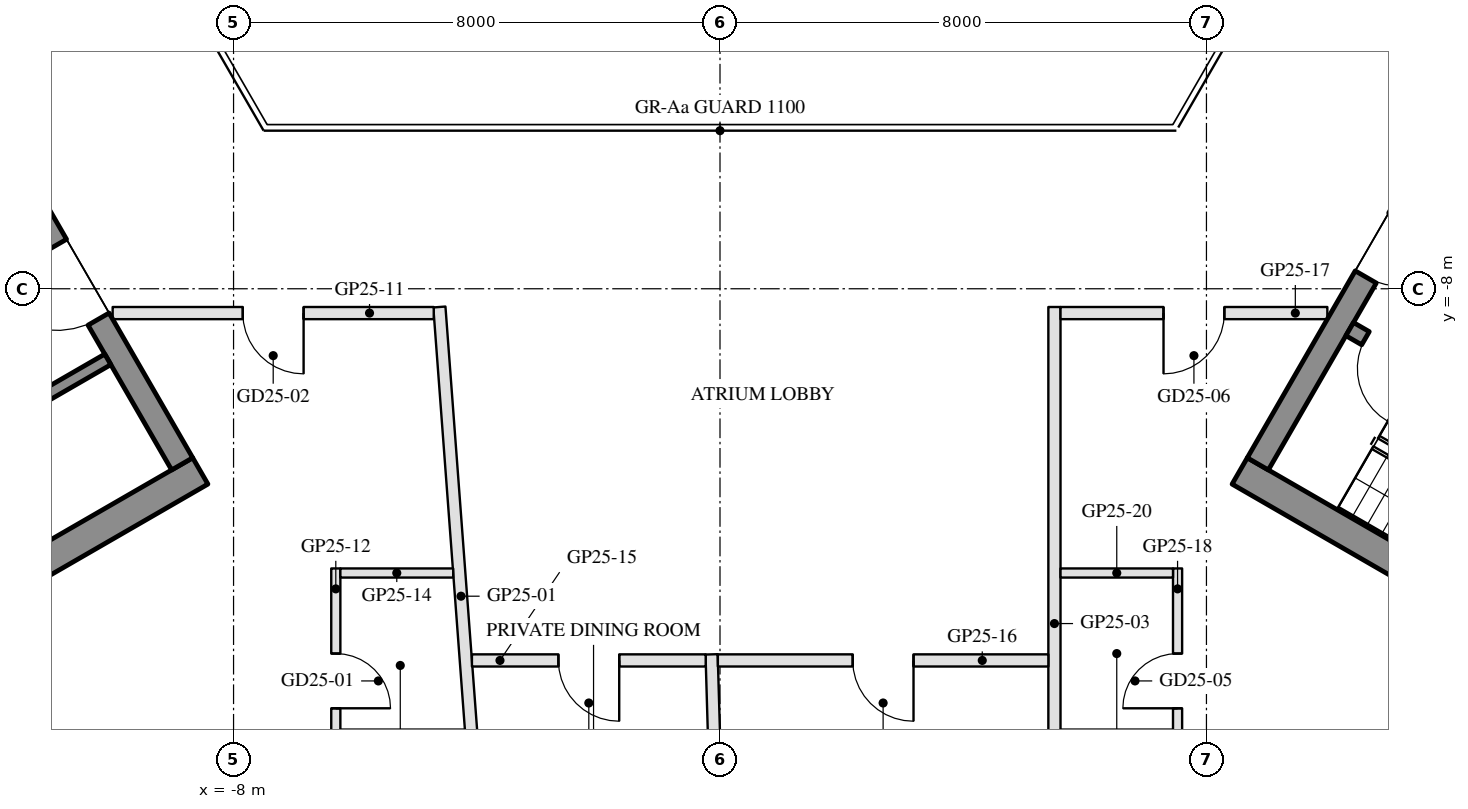
"""IFC4 building model, lengths in metres.
Left out: names, types, materials, properties, quantities, classifications, styles, units other than length and angle.
Written with IfcOpenShell. Run it as: python <this file> out.ifc"""

import sys

from ifc_helpers import new_model, si_unit, direction, frame, frame_2d, origin, place, context, subcontext, project, spatial, rectangle, extrude, element, fill, save


model = new_model("IFC4")
c1 = context("Model", 3, precision=1e-05, world=origin(), true_north=direction((0.0, 1.0)))
c2 = subcontext(c1, "Body", "Model", "MODEL_VIEW")
j1 = project(units=[si_unit("LENGTHUNIT", "METRE"), si_unit("PLANEANGLEUNIT", "RADIAN")], contexts=[c1])
p1 = place(None, origin())
s1 = spatial("IfcSite", under=j1, at=p1, CompositionType="ELEMENT")
p2 = place(p1, origin())
s2 = spatial("IfcBuilding", under=s1, at=p2, CompositionType="ELEMENT")
p3 = place(p2, frame((0.0, 0.0, 265.2)))
s3 = spatial("IfcBuildingStorey", under=s2, at=p3, CompositionType="ELEMENT", Elevation=265.2)
p4 = place(p3, frame((-8.547, -10.997, 0.0), z_axis=(0.0, 0.0, 1.0), x_axis=(-0.86602744543, -0.49999646375, 0.0)))
e1 = element("IfcWall", 1, at=p4, inside=s3, PredefinedType="SHEAR", context=c2, shape_type="SweptSolid", body=[
    extrude(rectangle(XDim=13.934, YDim=0.5, at=frame_2d((6.967, 0.0))), origin(), (0.0, 0.0, 1.0), 3.5),
])
p5 = place(p3, frame((-13.845, -2.22, 0.0), z_axis=(0.0, 0.0, 1.0), x_axis=(0.500004234368, -0.866022959057, 0.0)))
e2 = element("IfcWall", 2, at=p5, inside=s3, PredefinedType="SHEAR", context=c2, shape_type="SweptSolid", body=[
    extrude(rectangle(XDim=10.0, YDim=0.4, at=frame_2d((5.0, 0.0))), origin(), (0.0, 0.0, 1.0), 3.5),
])
p6 = place(p5, frame((3.55, 0.0, 0.0)))
e3 = element("IfcOpeningElement", 3, at=p6, cuts=e2, PredefinedType="OPENING", context=c2, shape_type="SweptSolid", body=[
    extrude(rectangle(XDim=1.1, YDim=2.1, at=frame_2d((0.55, 1.05))), frame((0.0, 0.21, 0.0), z_axis=(0.0, -1.0, 0.0), x_axis=(1.0, 0.0, 0.0)), (0.0, 0.0, 1.0), 0.42),
])
p7 = place(p5, frame((5.85, 0.0, 0.0)))
e4 = element("IfcOpeningElement", 4, at=p7, cuts=e2, PredefinedType="OPENING", context=c2, shape_type="SweptSolid", body=[
    extrude(rectangle(XDim=1.4, YDim=2.1, at=frame_2d((0.7, 1.05))), frame((0.0, 0.21, 0.0), z_axis=(0.0, -1.0, 0.0), x_axis=(1.0, 0.0, 0.0)), (0.0, 0.0, 1.0), 0.42),
])
p8 = place(p3, frame((-10.068, -9.162, 0.0), z_axis=(0.0, 0.0, 1.0), x_axis=(-0.866032725843, -0.499987317609, 0.0)))
e5 = element("IfcWall", 5, at=p8, inside=s3, PredefinedType="SHEAR", context=c2, shape_type="SweptSolid", body=[
    extrude(rectangle(XDim=10.16, YDim=0.2, at=frame_2d((5.08, 0.0))), origin(), (0.0, 0.0, 1.0), 3.5),
])
p9 = place(p8, frame((4.53, 0.0, 0.0)))
e6 = element("IfcOpeningElement", 6, at=p9, cuts=e5, PredefinedType="OPENING", context=c2, shape_type="SweptSolid", body=[
    extrude(rectangle(XDim=0.9, YDim=2.1, at=frame_2d((0.45, 1.05))), frame((0.0, 0.11, 0.0), z_axis=(0.0, -1.0, 0.0), x_axis=(1.0, 0.0, 0.0)), (0.0, 0.0, 1.0), 0.22),
])
p10 = place(p3, frame((8.547, -10.997, 0.0), z_axis=(0.0, 0.0, 1.0), x_axis=(0.86602744543, -0.49999646375, 0.0)))
e7 = element("IfcWall", 7, at=p10, inside=s3, PredefinedType="SHEAR", context=c2, shape_type="SweptSolid", body=[
    extrude(rectangle(XDim=13.934, YDim=0.5, at=frame_2d((6.967, 0.0))), origin(), (0.0, 0.0, 1.0), 3.5),
])
p11 = place(p3, frame((8.845, -10.88, 0.0), z_axis=(0.0, 0.0, 1.0), x_axis=(0.500004234368, 0.866022959057, 0.0)))
e8 = element("IfcWall", 8, at=p11, inside=s3, PredefinedType="SHEAR", context=c2, shape_type="SweptSolid", body=[
    extrude(rectangle(XDim=10.0, YDim=0.4, at=frame_2d((5.0, 0.0))), origin(), (0.0, 0.0, 1.0), 3.5),
])
p12 = place(p11, frame((3.55, 0.0, 0.0)))
e9 = element("IfcOpeningElement", 9, at=p12, cuts=e8, PredefinedType="OPENING", context=c2, shape_type="SweptSolid", body=[
    extrude(rectangle(XDim=1.1, YDim=2.1, at=frame_2d((0.55, 1.05))), frame((0.0, 0.21, 0.0), z_axis=(0.0, -1.0, 0.0), x_axis=(1.0, 0.0, 0.0)), (0.0, 0.0, 1.0), 0.42),
])
p13 = place(p11, frame((5.85, 0.0, 0.0)))
e10 = element("IfcOpeningElement", 10, at=p13, cuts=e8, PredefinedType="OPENING", context=c2, shape_type="SweptSolid", body=[
    extrude(rectangle(XDim=1.4, YDim=2.1, at=frame_2d((0.7, 1.05))), frame((0.0, 0.21, 0.0), z_axis=(0.0, -1.0, 0.0), x_axis=(1.0, 0.0, 0.0)), (0.0, 0.0, 1.0), 0.42),
])
p14 = place(p3, frame((10.356, -8.664, 0.0), z_axis=(0.0, 0.0, 1.0), x_axis=(0.866028629588, -0.499994412703, 0.0)))
e11 = element("IfcWall", 11, at=p14, inside=s3, PredefinedType="SHEAR", context=c2, shape_type="SweptSolid", body=[
    extrude(rectangle(XDim=6.45, YDim=0.25, at=frame_2d((3.225, 0.0))), origin(), (0.0, 0.0, 1.0), 3.5),
])
p15 = place(p14, frame((0.3, 0.0, 0.0)))
e12 = element("IfcOpeningElement", 12, at=p15, cuts=e11, PredefinedType="OPENING", context=c2, shape_type="SweptSolid", body=[
    extrude(rectangle(XDim=1.0, YDim=2.1, at=frame_2d((0.5, 1.05))), frame((0.0, 0.135, 0.0), z_axis=(0.0, -1.0, 0.0), x_axis=(1.0, 0.0, 0.0)), (0.0, 0.0, 1.0), 0.27),
])
p16 = place(p3, frame((-3.903, -17.813, 0.0), z_axis=(0.0, 0.0, 1.0), x_axis=(-0.074602257677, 0.997213368918, 0.0)))
e13 = element("IfcWall", 13, at=p16, inside=s3, PredefinedType="PARTITIONING", context=c2, shape_type="SweptSolid", body=[
    extrude(rectangle(XDim=9.54, YDim=0.2, at=frame_2d((4.77, 0.0))), origin(), (0.0, 0.0, 1.0), 3.1),
])
p17 = place(p3, frame((-0.057, -16.767, 0.0), z_axis=(0.0, 0.0, 1.0), x_axis=(-0.029417278295, 0.999567218219, 0.0)))
e14 = element("IfcWall", 14, at=p17, inside=s3, PredefinedType="PARTITIONING", context=c2, shape_type="SweptSolid", body=[
    extrude(rectangle(XDim=2.755, YDim=0.2, at=frame_2d((1.378, 0.0))), origin(), (0.0, 0.0, 1.0), 3.0),
])
p18 = place(p3, frame((5.5, -18.713, 0.0), z_axis=(0.0, 0.0, 1.0), x_axis=(0.0, 1.0, 0.0)))
e15 = element("IfcWall", 15, at=p18, inside=s3, PredefinedType="PARTITIONING", context=c2, shape_type="SweptSolid", body=[
    extrude(rectangle(XDim=10.413, YDim=0.2, at=frame_2d((5.207, 0.0))), origin(), (0.0, 0.0, 1.0), 3.1),
])
p19 = place(p3, frame((-4.708, -8.4, 0.0), z_axis=(0.0, 0.0, 1.0), x_axis=(-1.0, 0.0, 0.0)))
e16 = element("IfcWall", 16, at=p19, inside=s3, PredefinedType="PARTITIONING", context=c2, shape_type="SweptSolid", body=[
    extrude(rectangle(XDim=5.281, YDim=0.2, at=frame_2d((2.64, 0.0))), origin(), (0.0, 0.0, 1.0), 3.0),
])
p20 = place(p19, frame((2.14, 0.0, 0.0)))
e17 = element("IfcOpeningElement", 17, at=p20, cuts=e16, PredefinedType="OPENING", context=c2, shape_type="SweptSolid", body=[
    extrude(rectangle(XDim=1.0, YDim=2.1, at=frame_2d((0.5, 1.05))), frame((0.0, 0.11, 0.0), z_axis=(0.0, -1.0, 0.0), x_axis=(1.0, 0.0, 0.0)), (0.0, 0.0, 1.0), 0.22),
])
p21 = place(p3, frame((-6.319, -12.6, 0.0), z_axis=(0.0, 0.0, 1.0), x_axis=(0.0, -1.0, 0.0)))
e18 = element("IfcWall", 18, at=p21, inside=s3, PredefinedType="PARTITIONING", context=c2, shape_type="SweptSolid", body=[
    extrude(rectangle(XDim=2.8, YDim=0.15, at=frame_2d((1.4, 0.0))), origin(), (0.0, 0.0, 1.0), 3.55),
])
p22 = place(p21, frame((1.4, 0.0, 0.0)))
e19 = element("IfcOpeningElement", 19, at=p22, cuts=e18, PredefinedType="OPENING", context=c2, shape_type="SweptSolid", body=[
    extrude(rectangle(XDim=0.9, YDim=2.1, at=frame_2d((0.45, 1.05))), frame((0.0, 0.085, 0.0), z_axis=(0.0, -1.0, 0.0), x_axis=(1.0, 0.0, 0.0)), (0.0, 0.0, 1.0), 0.17),
])
p23 = place(p3, frame((-6.243, -12.675, 0.0), z_axis=(0.0, 0.0, 1.0), x_axis=(1.0, 0.0, 0.0)))
e20 = element("IfcWall", 20, at=p23, inside=s3, PredefinedType="PARTITIONING", context=c2, shape_type="SweptSolid", body=[
    extrude(rectangle(XDim=1.855, YDim=0.15, at=frame_2d((0.928, 0.0))), origin(), (0.0, 0.0, 1.0), 3.55),
])
p24 = place(p3, frame((-0.235, -14.113, 0.0), z_axis=(0.0, 0.0, 1.0), x_axis=(-1.0, 0.0, 0.0)))
e21 = element("IfcWall", 21, at=p24, inside=s3, PredefinedType="PARTITIONING", context=c2, shape_type="SweptSolid", body=[
    extrude(rectangle(XDim=3.845, YDim=0.2, at=frame_2d((1.922, 0.0))), origin(), (0.0, 0.0, 1.0), 3.0),
])
p25 = place(p24, frame((1.422, 0.0, 0.0)))
e22 = element("IfcOpeningElement", 22, at=p25, cuts=e21, PredefinedType="OPENING", context=c2, shape_type="SweptSolid", body=[
    extrude(rectangle(XDim=1.0, YDim=2.1, at=frame_2d((0.5, 1.05))), frame((0.0, 0.11, 0.0), z_axis=(0.0, -1.0, 0.0), x_axis=(1.0, 0.0, 0.0)), (0.0, 0.0, 1.0), 0.22),
])
p26 = place(p3, frame((5.4, -14.113, 0.0), z_axis=(0.0, 0.0, 1.0), x_axis=(-1.0, 0.0, 0.0)))
e23 = element("IfcWall", 23, at=p26, inside=s3, PredefinedType="PARTITIONING", context=c2, shape_type="SweptSolid", body=[
    extrude(rectangle(XDim=5.435, YDim=0.2, at=frame_2d((2.718, 0.0))), origin(), (0.0, 0.0, 1.0), 3.0),
])
p27 = place(p26, frame((2.218, 0.0, 0.0)))
e24 = element("IfcOpeningElement", 24, at=p27, cuts=e23, PredefinedType="OPENING", context=c2, shape_type="SweptSolid", body=[
    extrude(rectangle(XDim=1.0, YDim=2.1, at=frame_2d((0.5, 1.05))), frame((0.0, 0.11, 0.0), z_axis=(0.0, -1.0, 0.0), x_axis=(1.0, 0.0, 0.0)), (0.0, 0.0, 1.0), 0.22),
])
p28 = place(p3, frame((9.988, -8.4, 0.0), z_axis=(0.0, 0.0, 1.0), x_axis=(-1.0, 0.0, 0.0)))
e25 = element("IfcWall", 25, at=p28, inside=s3, PredefinedType="PARTITIONING", context=c2, shape_type="SweptSolid", body=[
    extrude(rectangle(XDim=4.388, YDim=0.2, at=frame_2d((2.194, 0.0))), origin(), (0.0, 0.0, 1.0), 3.0),
])
p29 = place(p28, frame((1.694, 0.0, 0.0)))
e26 = element("IfcOpeningElement", 26, at=p29, cuts=e25, PredefinedType="OPENING", context=c2, shape_type="SweptSolid", body=[
    extrude(rectangle(XDim=1.0, YDim=2.1, at=frame_2d((0.5, 1.05))), frame((0.0, 0.11, 0.0), z_axis=(0.0, -1.0, 0.0), x_axis=(1.0, 0.0, 0.0)), (0.0, 0.0, 1.0), 0.22),
])
p30 = place(p3, frame((7.525, -15.4, 0.0), z_axis=(0.0, 0.0, 1.0), x_axis=(0.0, 1.0, 0.0)))
e27 = element("IfcWall", 27, at=p30, inside=s3, PredefinedType="PARTITIONING", context=c2, shape_type="SweptSolid", body=[
    extrude(rectangle(XDim=2.8, YDim=0.15, at=frame_2d((1.4, 0.0))), origin(), (0.0, 0.0, 1.0), 3.0),
])
p31 = place(p30, frame((0.5, 0.0, 0.0)))
e28 = element("IfcOpeningElement", 28, at=p31, cuts=e27, PredefinedType="OPENING", context=c2, shape_type="SweptSolid", body=[
    extrude(rectangle(XDim=0.9, YDim=2.1, at=frame_2d((0.45, 1.05))), frame((0.0, 0.085, 0.0), z_axis=(0.0, -1.0, 0.0), x_axis=(1.0, 0.0, 0.0)), (0.0, 0.0, 1.0), 0.17),
])
p32 = place(p3, frame((5.6, -12.675, 0.0), z_axis=(0.0, 0.0, 1.0), x_axis=(1.0, 0.0, 0.0)))
e29 = element("IfcWall", 29, at=p32, inside=s3, PredefinedType="PARTITIONING", context=c2, shape_type="SweptSolid", body=[
    extrude(rectangle(XDim=1.85, YDim=0.15, at=frame_2d((0.925, 0.0))), origin(), (0.0, 0.0, 1.0), 3.0),
])
p33 = place(p3, frame((10.378, -1.175, 0.0), z_axis=(0.0, 0.0, 1.0), x_axis=(0.50004096614, -0.86600175068, 0.0)))
e30 = element("IfcWall", 30, at=p33, inside=s3, PredefinedType="PARTITIONING", context=c2, shape_type="SweptSolid", body=[
    extrude(rectangle(XDim=3.782, YDim=0.2, at=frame_2d((1.891, 0.0))), origin(), (0.0, 0.0, 1.0), 3.0),
])
p34 = place(p33, frame((1.391, 0.0, 0.0)))
e31 = element("IfcOpeningElement", 31, at=p34, cuts=e30, PredefinedType="OPENING", context=c2, shape_type="SweptSolid", body=[
    extrude(rectangle(XDim=1.0, YDim=2.1, at=frame_2d((0.5, 1.05))), frame((0.0, 0.11, 0.0), z_axis=(0.0, -1.0, 0.0), x_axis=(1.0, 0.0, 0.0)), (0.0, 0.0, 1.0), 0.22),
])
p35 = place(p3, frame((-12.269, -4.45, 0.0), z_axis=(0.0, 0.0, 1.0), x_axis=(0.500009958894, 0.866019653938, 0.0)))
e32 = element("IfcWall", 32, at=p35, inside=s3, PredefinedType="PARTITIONING", context=c2, shape_type="SweptSolid", body=[
    extrude(rectangle(XDim=5.685, YDim=0.2, at=frame_2d((2.842, 0.0))), origin(), (0.0, 0.0, 1.0), 3.0),
])
p36 = place(p35, frame((2.342, 0.0, 0.0)))
e33 = element("IfcOpeningElement", 33, at=p36, cuts=e32, PredefinedType="OPENING", context=c2, shape_type="SweptSolid", body=[
    extrude(rectangle(XDim=1.0, YDim=2.1, at=frame_2d((0.5, 1.05))), frame((0.0, 0.11, 0.0), z_axis=(0.0, -1.0, 0.0), x_axis=(1.0, 0.0, 0.0)), (0.0, 0.0, 1.0), 0.22),
])
p37 = place(p7, frame((1.4, 0.0, 0.0), z_axis=(0.0, 0.0, 1.0), x_axis=(-1.0, 0.0, 0.0)))
e34 = element("IfcDoor", 34, at=p37, inside=s3, OperationType="DOUBLE_DOOR_SINGLE_SWING", PredefinedType="DOOR", context=c2, shape_type="SweptSolid", body=[
    extrude(rectangle(XDim=1.4, YDim=2.1, at=frame_2d((0.7, 1.05))), frame((0.0, 0.025, 0.0), z_axis=(0.0, -1.0, 0.0), x_axis=(1.0, 0.0, 0.0)), (0.0, 0.0, 1.0), 0.05),
])
fill(e4, e34)
p38 = place(p12, frame((1.1, 0.0, 0.0), z_axis=(0.0, 0.0, 1.0), x_axis=(-1.0, 0.0, 0.0)))
e35 = element("IfcDoor", 35, at=p38, inside=s3, OperationType="SINGLE_SWING_LEFT", PredefinedType="DOOR", context=c2, shape_type="SweptSolid", body=[
    extrude(rectangle(XDim=1.1, YDim=2.1, at=frame_2d((0.55, 1.05))), frame((0.0, 0.025, 0.0), z_axis=(0.0, -1.0, 0.0), x_axis=(1.0, 0.0, 0.0)), (0.0, 0.0, 1.0), 0.05),
])
fill(e9, e35)
p39 = place(p15, frame((1.0, 0.0, 0.0), z_axis=(0.0, 0.0, 1.0), x_axis=(-1.0, 0.0, 0.0)))
e36 = element("IfcDoor", 36, at=p39, inside=s3, OperationType="SINGLE_SWING_LEFT", PredefinedType="DOOR", context=c2, shape_type="SweptSolid", body=[
    extrude(rectangle(XDim=1.0, YDim=2.1, at=frame_2d((0.5, 1.05))), frame((0.0, 0.025, 0.0), z_axis=(0.0, -1.0, 0.0), x_axis=(1.0, 0.0, 0.0)), (0.0, 0.0, 1.0), 0.05),
])
fill(e12, e36)
p40 = place(p22, origin())
e37 = element("IfcDoor", 37, at=p40, inside=s3, OperationType="SINGLE_SWING_RIGHT", PredefinedType="DOOR", context=c2, shape_type="SweptSolid", body=[
    extrude(rectangle(XDim=0.9, YDim=2.1, at=frame_2d((0.45, 1.05))), frame((0.0, 0.025, 0.0), z_axis=(0.0, -1.0, 0.0), x_axis=(1.0, 0.0, 0.0)), (0.0, 0.0, 1.0), 0.05),
])
fill(e19, e37)
p41 = place(p20, origin())
e38 = element("IfcDoor", 38, at=p41, inside=s3, OperationType="SINGLE_SWING_LEFT", PredefinedType="DOOR", context=c2, shape_type="SweptSolid", body=[
    extrude(rectangle(XDim=1.0, YDim=2.1, at=frame_2d((0.5, 1.05))), frame((0.0, 0.025, 0.0), z_axis=(0.0, -1.0, 0.0), x_axis=(1.0, 0.0, 0.0)), (0.0, 0.0, 1.0), 0.05),
])
fill(e17, e38)
p42 = place(p25, origin())
e39 = element("IfcDoor", 39, at=p42, inside=s3, OperationType="SINGLE_SWING_LEFT", PredefinedType="DOOR", context=c2, shape_type="SweptSolid", body=[
    extrude(rectangle(XDim=1.0, YDim=2.1, at=frame_2d((0.5, 1.05))), frame((0.0, 0.025, 0.0), z_axis=(0.0, -1.0, 0.0), x_axis=(1.0, 0.0, 0.0)), (0.0, 0.0, 1.0), 0.05),
])
fill(e22, e39)
p43 = place(p27, origin())
e40 = element("IfcDoor", 40, at=p43, inside=s3, OperationType="SINGLE_SWING_LEFT", PredefinedType="DOOR", context=c2, shape_type="SweptSolid", body=[
    extrude(rectangle(XDim=1.0, YDim=2.1, at=frame_2d((0.5, 1.05))), frame((0.0, 0.025, 0.0), z_axis=(0.0, -1.0, 0.0), x_axis=(1.0, 0.0, 0.0)), (0.0, 0.0, 1.0), 0.05),
])
fill(e24, e40)
p44 = place(p31, origin())
e41 = element("IfcDoor", 41, at=p44, inside=s3, OperationType="SINGLE_SWING_LEFT", PredefinedType="DOOR", context=c2, shape_type="SweptSolid", body=[
    extrude(rectangle(XDim=0.9, YDim=2.1, at=frame_2d((0.45, 1.05))), frame((0.0, 0.025, 0.0), z_axis=(0.0, -1.0, 0.0), x_axis=(1.0, 0.0, 0.0)), (0.0, 0.0, 1.0), 0.05),
])
fill(e28, e41)
p45 = place(p29, origin())
e42 = element("IfcDoor", 42, at=p45, inside=s3, OperationType="SINGLE_SWING_RIGHT", PredefinedType="DOOR", context=c2, shape_type="SweptSolid", body=[
    extrude(rectangle(XDim=1.0, YDim=2.1, at=frame_2d((0.5, 1.05))), frame((0.0, 0.025, 0.0), z_axis=(0.0, -1.0, 0.0), x_axis=(1.0, 0.0, 0.0)), (0.0, 0.0, 1.0), 0.05),
])
fill(e26, e42)
save(model, sys.argv[1])
